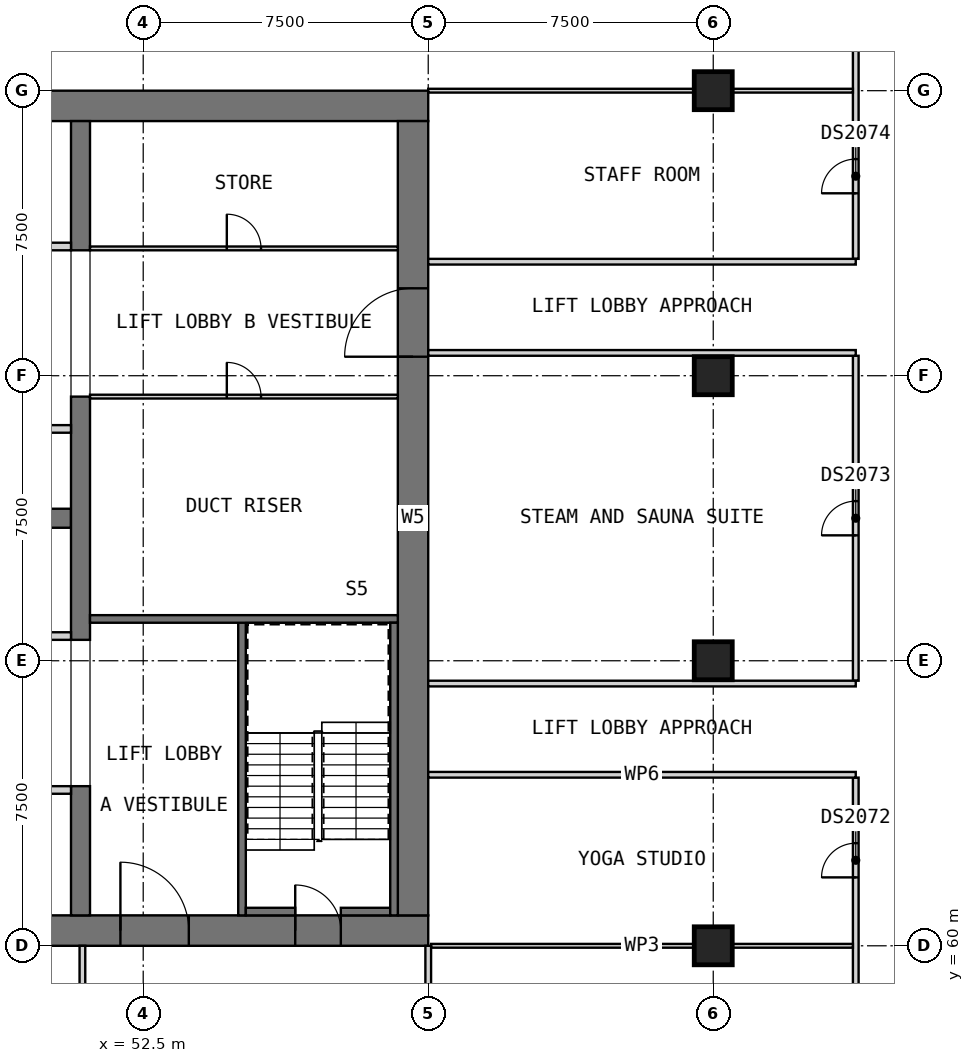
"""IFC4 building model, lengths in metres.
Left out: names, types, materials, properties, quantities, classifications, styles, units other than length and angle.
Written with IfcOpenShell. Run it as: python <this file> out.ifc"""

import sys

from ifc_helpers import new_model, si_unit, direction, frame, frame_2d, origin, origin_2d, place, context, subcontext, project, spatial, rectangle, extrude, element, fill, save


model = new_model("IFC4")
c1 = context("Model", 3, precision=1e-05, world=origin(), true_north=direction((0.0, 1.0)))
c2 = subcontext(c1, "Body", "Model", "MODEL_VIEW")
j1 = project(units=[si_unit("LENGTHUNIT", "METRE"), si_unit("PLANEANGLEUNIT", "RADIAN")], contexts=[c1])
p1 = place(None, origin())
s1 = spatial("IfcSite", under=j1, at=p1, CompositionType="ELEMENT")
p2 = place(p1, origin())
s2 = spatial("IfcBuilding", under=s1, at=p2, CompositionType="ELEMENT")
p3 = place(p2, frame((0.0, 0.0, 162.6)))
s3 = spatial("IfcBuildingStorey", under=s2, at=p3, CompositionType="ELEMENT", Elevation=162.6)
for number, where, z_axis, x_axis in (
    (1, (67.5, 60.0, 0.0), (0.0, 0.0, 1.0), (1.0, 0.0, 0.0)),
    (2, (67.5, 67.5, 0.0), (0.0, 0.0, 1.0), (1.0, 0.0, 0.0)),
    (3, (67.5, 75.0, 0.0), (0.0, 0.0, 1.0), (1.0, 0.0, 0.0)),
    (4, (67.5, 82.5, 0.0), (0.0, 0.0, 1.0), (1.0, 0.0, 0.0)),
):
    element("IfcColumn", number, at=place(p3, frame(where, z_axis=z_axis, x_axis=x_axis)), inside=s3, PredefinedType="COLUMN", context=c2, shape_type="SweptSolid", body=[
        extrude(rectangle(XDim=1.0, YDim=1.0, at=origin_2d()), origin(), (0.0, 0.0, 1.0), 3.6),
    ])
p4 = place(p3, frame((30.0, 60.4, 0.0), z_axis=(0.0, 0.0, 1.0), x_axis=(1.0, 0.0, 0.0)))
e5 = element("IfcWall", 5, at=p4, inside=s3, PredefinedType="SHEAR", context=c2, shape_type="SweptSolid", body=[
    extrude(rectangle(XDim=30.0, YDim=0.8, at=frame_2d((15.0, 0.0))), origin(), (0.0, 0.0, 1.0), 3.6),
])
p5 = place(p4, frame((21.9, 0.0, 0.0)))
e6 = element("IfcOpeningElement", 6, at=p5, cuts=e5, PredefinedType="OPENING", context=c2, shape_type="SweptSolid", body=[
    extrude(rectangle(XDim=1.8, YDim=2.1, at=frame_2d((0.9, 1.05))), frame((0.0, 0.41, 0.0), z_axis=(0.0, -1.0, 0.0), x_axis=(1.0, 0.0, 0.0)), (0.0, 0.0, 1.0), 0.82),
])
p6 = place(p4, frame((26.5, 0.0, 0.0)))
e7 = element("IfcOpeningElement", 7, at=p6, cuts=e5, PredefinedType="OPENING", context=c2, shape_type="SweptSolid", body=[
    extrude(rectangle(XDim=1.2, YDim=2.1, at=frame_2d((0.6, 1.05))), frame((0.0, 0.41, 0.0), z_axis=(0.0, -1.0, 0.0), x_axis=(1.0, 0.0, 0.0)), (0.0, 0.0, 1.0), 0.82),
])
p7 = place(p3, frame((30.0, 82.1, 0.0), z_axis=(0.0, 0.0, 1.0), x_axis=(1.0, 0.0, 0.0)))
e8 = element("IfcWall", 8, at=p7, inside=s3, PredefinedType="SHEAR", context=c2, shape_type="SweptSolid", body=[
    extrude(rectangle(XDim=30.0, YDim=0.8, at=frame_2d((15.0, 0.0))), origin(), (0.0, 0.0, 1.0), 3.6),
])
p8 = place(p3, frame((59.6, 60.8, 0.0), z_axis=(0.0, 0.0, 1.0), x_axis=(0.0, 1.0, 0.0)))
e9 = element("IfcWall", 9, at=p8, inside=s3, PredefinedType="SHEAR", context=c2, shape_type="SweptSolid", body=[
    extrude(rectangle(XDim=20.9, YDim=0.8, at=frame_2d((10.45, 0.0))), origin(), (0.0, 0.0, 1.0), 3.6),
])
p9 = place(p8, frame((14.7, 0.0, 0.0)))
e10 = element("IfcOpeningElement", 10, at=p9, cuts=e9, PredefinedType="OPENING", context=c2, shape_type="SweptSolid", body=[
    extrude(rectangle(XDim=1.8, YDim=2.1, at=frame_2d((0.9, 1.05))), frame((0.0, 0.41, 0.0), z_axis=(0.0, -1.0, 0.0), x_axis=(1.0, 0.0, 0.0)), (0.0, 0.0, 1.0), 0.82),
])
p10 = place(p3, frame((35.0, 71.25, 0.0), z_axis=(0.0, 0.0, 1.0), x_axis=(1.0, 0.0, 0.0)))
e11 = element("IfcWall", 11, at=p10, inside=s3, PredefinedType="SHEAR", context=c2, shape_type="SweptSolid", body=[
    extrude(rectangle(XDim=15.6, YDim=0.5, at=frame_2d((7.8, 0.0))), origin(), (0.0, 0.0, 1.0), 3.6),
])
p11 = place(p3, frame((50.85, 60.8, 0.0), z_axis=(0.0, 0.0, 1.0), x_axis=(0.0, 1.0, 0.0)))
e12 = element("IfcWall", 12, at=p11, inside=s3, PredefinedType="SHEAR", context=c2, shape_type="SweptSolid", body=[
    extrude(rectangle(XDim=3.4, YDim=0.5, at=frame_2d((1.7, 0.0))), origin(), (0.0, 0.0, 1.0), 3.6),
])
p12 = place(p3, frame((50.85, 68.05, 0.0), z_axis=(0.0, 0.0, 1.0), x_axis=(0.0, 1.0, 0.0)))
e13 = element("IfcWall", 13, at=p12, inside=s3, PredefinedType="SHEAR", context=c2, shape_type="SweptSolid", body=[
    extrude(rectangle(XDim=6.4, YDim=0.5, at=frame_2d((3.2, 0.0))), origin(), (0.0, 0.0, 1.0), 3.6),
])
p13 = place(p3, frame((50.85, 78.3, 0.0), z_axis=(0.0, 0.0, 1.0), x_axis=(0.0, 1.0, 0.0)))
e14 = element("IfcWall", 14, at=p13, inside=s3, PredefinedType="SHEAR", context=c2, shape_type="SweptSolid", body=[
    extrude(rectangle(XDim=3.4, YDim=0.5, at=frame_2d((1.7, 0.0))), origin(), (0.0, 0.0, 1.0), 3.6),
])
p14 = place(p3, frame((35.0, 64.1, 0.0), z_axis=(0.0, 0.0, 1.0), x_axis=(1.0, 0.0, 0.0)))
e15 = element("IfcWall", 15, at=p14, inside=s3, PredefinedType="PARTITIONING", context=c2, shape_type="SweptSolid", body=[
    extrude(rectangle(XDim=15.6, YDim=0.2, at=frame_2d((7.8, 0.0))), origin(), (0.0, 0.0, 1.0), 3.19),
])
p15 = place(p14, frame((3.525, 0.0, 0.0)))
e16 = element("IfcOpeningElement", 16, at=p15, cuts=e15, PredefinedType="OPENING", context=c2, shape_type="SweptSolid", body=[
    extrude(rectangle(XDim=0.9, YDim=2.1, at=frame_2d((0.45, 1.05))), frame((0.0, 0.11, 0.0), z_axis=(0.0, -1.0, 0.0), x_axis=(1.0, 0.0, 0.0)), (0.0, 0.0, 1.0), 0.22),
])
p16 = place(p14, frame((11.325, 0.0, 0.0)))
e17 = element("IfcOpeningElement", 17, at=p16, cuts=e15, PredefinedType="OPENING", context=c2, shape_type="SweptSolid", body=[
    extrude(rectangle(XDim=0.9, YDim=2.1, at=frame_2d((0.45, 1.05))), frame((0.0, 0.11, 0.0), z_axis=(0.0, -1.0, 0.0), x_axis=(1.0, 0.0, 0.0)), (0.0, 0.0, 1.0), 0.22),
])
p17 = place(p3, frame((35.0, 68.15, 0.0), z_axis=(0.0, 0.0, 1.0), x_axis=(1.0, 0.0, 0.0)))
e18 = element("IfcWall", 18, at=p17, inside=s3, PredefinedType="PARTITIONING", context=c2, shape_type="SweptSolid", body=[
    extrude(rectangle(XDim=15.6, YDim=0.2, at=frame_2d((7.8, 0.0))), origin(), (0.0, 0.0, 1.0), 3.19),
])
p18 = place(p17, frame((2.6, 0.0, 0.0)))
e19 = element("IfcOpeningElement", 19, at=p18, cuts=e18, PredefinedType="OPENING", context=c2, shape_type="SweptSolid", body=[
    extrude(rectangle(XDim=0.9, YDim=2.1, at=frame_2d((0.45, 1.05))), frame((0.0, 0.11, 0.0), z_axis=(0.0, -1.0, 0.0), x_axis=(1.0, 0.0, 0.0)), (0.0, 0.0, 1.0), 0.22),
])
p19 = place(p17, frame((10.4, 0.0, 0.0)))
e20 = element("IfcOpeningElement", 20, at=p19, cuts=e18, PredefinedType="OPENING", context=c2, shape_type="SweptSolid", body=[
    extrude(rectangle(XDim=0.9, YDim=2.1, at=frame_2d((0.45, 1.05))), frame((0.0, 0.11, 0.0), z_axis=(0.0, -1.0, 0.0), x_axis=(1.0, 0.0, 0.0)), (0.0, 0.0, 1.0), 0.22),
])
p20 = place(p3, frame((35.0, 73.6, 0.0), z_axis=(0.0, 0.0, 1.0), x_axis=(1.0, 0.0, 0.0)))
e21 = element("IfcWall", 21, at=p20, inside=s3, PredefinedType="SOLIDWALL", context=c2, shape_type="SweptSolid", body=[
    extrude(rectangle(XDim=15.6, YDim=0.2, at=frame_2d((7.8, 0.0))), origin(), (0.0, 0.0, 1.0), 3.6),
])
p21 = place(p20, frame((0.75, 0.0, 0.0)))
e22 = element("IfcOpeningElement", 22, at=p21, cuts=e21, PredefinedType="OPENING", context=c2, shape_type="SweptSolid", body=[
    extrude(rectangle(XDim=1.1, YDim=2.1, at=frame_2d((0.55, 1.05))), frame((0.0, 0.11, 0.0), z_axis=(0.0, -1.0, 0.0), x_axis=(1.0, 0.0, 0.0)), (0.0, 0.0, 1.0), 0.22),
])
p22 = place(p20, frame((3.35, 0.0, 0.0)))
e23 = element("IfcOpeningElement", 23, at=p22, cuts=e21, PredefinedType="OPENING", context=c2, shape_type="SweptSolid", body=[
    extrude(rectangle(XDim=1.1, YDim=2.1, at=frame_2d((0.55, 1.05))), frame((0.0, 0.11, 0.0), z_axis=(0.0, -1.0, 0.0), x_axis=(1.0, 0.0, 0.0)), (0.0, 0.0, 1.0), 0.22),
])
p23 = place(p20, frame((5.95, 0.0, 0.0)))
e24 = element("IfcOpeningElement", 24, at=p23, cuts=e21, PredefinedType="OPENING", context=c2, shape_type="SweptSolid", body=[
    extrude(rectangle(XDim=1.1, YDim=2.1, at=frame_2d((0.55, 1.05))), frame((0.0, 0.11, 0.0), z_axis=(0.0, -1.0, 0.0), x_axis=(1.0, 0.0, 0.0)), (0.0, 0.0, 1.0), 0.22),
])
p24 = place(p20, frame((8.55, 0.0, 0.0)))
e25 = element("IfcOpeningElement", 25, at=p24, cuts=e21, PredefinedType="OPENING", context=c2, shape_type="SweptSolid", body=[
    extrude(rectangle(XDim=1.1, YDim=2.1, at=frame_2d((0.55, 1.05))), frame((0.0, 0.11, 0.0), z_axis=(0.0, -1.0, 0.0), x_axis=(1.0, 0.0, 0.0)), (0.0, 0.0, 1.0), 0.22),
])
p25 = place(p20, frame((11.15, 0.0, 0.0)))
e26 = element("IfcOpeningElement", 26, at=p25, cuts=e21, PredefinedType="OPENING", context=c2, shape_type="SweptSolid", body=[
    extrude(rectangle(XDim=1.1, YDim=2.1, at=frame_2d((0.55, 1.05))), frame((0.0, 0.11, 0.0), z_axis=(0.0, -1.0, 0.0), x_axis=(1.0, 0.0, 0.0)), (0.0, 0.0, 1.0), 0.22),
])
p26 = place(p20, frame((13.75, 0.0, 0.0)))
e27 = element("IfcOpeningElement", 27, at=p26, cuts=e21, PredefinedType="OPENING", context=c2, shape_type="SweptSolid", body=[
    extrude(rectangle(XDim=1.1, YDim=2.1, at=frame_2d((0.55, 1.05))), frame((0.0, 0.11, 0.0), z_axis=(0.0, -1.0, 0.0), x_axis=(1.0, 0.0, 0.0)), (0.0, 0.0, 1.0), 0.22),
])
p27 = place(p3, frame((35.0, 78.4, 0.0), z_axis=(0.0, 0.0, 1.0), x_axis=(1.0, 0.0, 0.0)))
e28 = element("IfcWall", 28, at=p27, inside=s3, PredefinedType="SOLIDWALL", context=c2, shape_type="SweptSolid", body=[
    extrude(rectangle(XDim=15.6, YDim=0.2, at=frame_2d((7.8, 0.0))), origin(), (0.0, 0.0, 1.0), 3.6),
])
p28 = place(p27, frame((0.75, 0.0, 0.0)))
e29 = element("IfcOpeningElement", 29, at=p28, cuts=e28, PredefinedType="OPENING", context=c2, shape_type="SweptSolid", body=[
    extrude(rectangle(XDim=1.1, YDim=2.1, at=frame_2d((0.55, 1.05))), frame((0.0, 0.11, 0.0), z_axis=(0.0, -1.0, 0.0), x_axis=(1.0, 0.0, 0.0)), (0.0, 0.0, 1.0), 0.22),
])
p29 = place(p27, frame((3.35, 0.0, 0.0)))
e30 = element("IfcOpeningElement", 30, at=p29, cuts=e28, PredefinedType="OPENING", context=c2, shape_type="SweptSolid", body=[
    extrude(rectangle(XDim=1.1, YDim=2.1, at=frame_2d((0.55, 1.05))), frame((0.0, 0.11, 0.0), z_axis=(0.0, -1.0, 0.0), x_axis=(1.0, 0.0, 0.0)), (0.0, 0.0, 1.0), 0.22),
])
p30 = place(p27, frame((11.15, 0.0, 0.0)))
e31 = element("IfcOpeningElement", 31, at=p30, cuts=e28, PredefinedType="OPENING", context=c2, shape_type="SweptSolid", body=[
    extrude(rectangle(XDim=1.1, YDim=2.1, at=frame_2d((0.55, 1.05))), frame((0.0, 0.11, 0.0), z_axis=(0.0, -1.0, 0.0), x_axis=(1.0, 0.0, 0.0)), (0.0, 0.0, 1.0), 0.22),
])
p31 = place(p27, frame((13.75, 0.0, 0.0)))
e32 = element("IfcOpeningElement", 32, at=p31, cuts=e28, PredefinedType="OPENING", context=c2, shape_type="SweptSolid", body=[
    extrude(rectangle(XDim=1.1, YDim=2.1, at=frame_2d((0.55, 1.05))), frame((0.0, 0.11, 0.0), z_axis=(0.0, -1.0, 0.0), x_axis=(1.0, 0.0, 0.0)), (0.0, 0.0, 1.0), 0.22),
])
p32 = place(p3, frame((55.1, 60.8, 0.0), z_axis=(0.0, 0.0, 1.0), x_axis=(0.0, 1.0, 0.0)))
e33 = element("IfcWall", 33, at=p32, inside=s3, PredefinedType="SOLIDWALL", context=c2, shape_type="SweptSolid", body=[
    extrude(rectangle(XDim=7.8, YDim=0.2, at=frame_2d((3.9, 0.0))), origin(), (0.0, 0.0, 1.0), 3.19),
])
p33 = place(p3, frame((51.1, 68.6, 0.0), z_axis=(0.0, 0.0, 1.0), x_axis=(1.0, 0.0, 0.0)))
e34 = element("IfcWall", 34, at=p33, inside=s3, PredefinedType="SOLIDWALL", context=c2, shape_type="SweptSolid", body=[
    extrude(rectangle(XDim=8.1, YDim=0.2, at=frame_2d((4.05, 0.0))), origin(), (0.0, 0.0, 1.0), 3.19),
])
for number, where, z_axis, x_axis in (
    (35, (55.2, 60.9, 0.0), (0.0, 0.0, 1.0), (1.0, 0.0, 0.0)),
    (36, (57.7, 60.9, 0.0), (0.0, 0.0, 1.0), (1.0, 0.0, 0.0)),
):
    element("IfcWall", number, at=place(p3, frame(where, z_axis=z_axis, x_axis=x_axis)), inside=s3, PredefinedType="SOLIDWALL", context=c2, shape_type="SweptSolid", body=[
        extrude(rectangle(XDim=1.3, YDim=0.2, at=frame_2d((0.65, 0.0))), origin(), (0.0, 0.0, 1.0), 3.19),
    ])
p34 = place(p3, frame((59.1, 60.8, 0.0), z_axis=(0.0, 0.0, 1.0), x_axis=(0.0, 1.0, 0.0)))
e37 = element("IfcWall", 37, at=p34, inside=s3, PredefinedType="SOLIDWALL", context=c2, shape_type="SweptSolid", body=[
    extrude(rectangle(XDim=7.7, YDim=0.2, at=frame_2d((3.85, 0.0))), origin(), (0.0, 0.0, 1.0), 3.19),
])
p35 = place(p3, frame((51.1, 74.45, 0.0), z_axis=(0.0, 0.0, 1.0), x_axis=(1.0, 0.0, 0.0)))
e38 = element("IfcWall", 38, at=p35, inside=s3, PredefinedType="PARTITIONING", context=c2, shape_type="SweptSolid", body=[
    extrude(rectangle(XDim=8.1, YDim=0.1, at=frame_2d((4.05, 0.0))), origin(), (0.0, 0.0, 1.0), 3.19),
])
p36 = place(p35, frame((3.6, 0.0, 0.0)))
e39 = element("IfcOpeningElement", 39, at=p36, cuts=e38, PredefinedType="OPENING", context=c2, shape_type="SweptSolid", body=[
    extrude(rectangle(XDim=0.9, YDim=2.1, at=frame_2d((0.45, 1.05))), frame((0.0, 0.06, 0.0), z_axis=(0.0, -1.0, 0.0), x_axis=(1.0, 0.0, 0.0)), (0.0, 0.0, 1.0), 0.12),
])
p37 = place(p3, frame((51.1, 78.35, 0.0), z_axis=(0.0, 0.0, 1.0), x_axis=(1.0, 0.0, 0.0)))
e40 = element("IfcWall", 40, at=p37, inside=s3, PredefinedType="PARTITIONING", context=c2, shape_type="SweptSolid", body=[
    extrude(rectangle(XDim=8.1, YDim=0.1, at=frame_2d((4.05, 0.0))), origin(), (0.0, 0.0, 1.0), 3.19),
])
p38 = place(p37, frame((3.6, 0.0, 0.0)))
e41 = element("IfcOpeningElement", 41, at=p38, cuts=e40, PredefinedType="OPENING", context=c2, shape_type="SweptSolid", body=[
    extrude(rectangle(XDim=0.9, YDim=2.1, at=frame_2d((0.45, 1.05))), frame((0.0, 0.06, 0.0), z_axis=(0.0, -1.0, 0.0), x_axis=(1.0, 0.0, 0.0)), (0.0, 0.0, 1.0), 0.12),
])
p39 = place(p3, frame((71.25, 52.575, 0.0), z_axis=(0.0, 0.0, 1.0), x_axis=(0.0, 1.0, 0.0)))
e42 = element("IfcWall", 42, at=p39, inside=s3, PredefinedType="PARTITIONING", context=c2, shape_type="SweptSolid", body=[
    extrude(rectangle(XDim=11.85, YDim=0.15, at=frame_2d((5.925, 0.0))), origin(), (0.0, 0.0, 1.0), 3.2),
])
p40 = place(p39, frame((9.225, 0.0, 0.0)))
e43 = element("IfcOpeningElement", 43, at=p40, cuts=e42, PredefinedType="OPENING", context=c2, shape_type="SweptSolid", body=[
    extrude(rectangle(XDim=0.9, YDim=2.1, at=frame_2d((0.45, 1.05))), frame((0.0, 0.085, 0.0), z_axis=(0.0, -1.0, 0.0), x_axis=(1.0, 0.0, 0.0)), (0.0, 0.0, 1.0), 0.17),
])
p41 = place(p3, frame((71.25, 66.975, 0.0), z_axis=(0.0, 0.0, 1.0), x_axis=(0.0, 1.0, 0.0)))
e44 = element("IfcWall", 44, at=p41, inside=s3, PredefinedType="PARTITIONING", context=c2, shape_type="SweptSolid", body=[
    extrude(rectangle(XDim=8.55, YDim=0.15, at=frame_2d((4.275, 0.0))), origin(), (0.0, 0.0, 1.0), 3.2),
])
p42 = place(p41, frame((3.825, 0.0, 0.0)))
e45 = element("IfcOpeningElement", 45, at=p42, cuts=e44, PredefinedType="OPENING", context=c2, shape_type="SweptSolid", body=[
    extrude(rectangle(XDim=0.9, YDim=2.1, at=frame_2d((0.45, 1.05))), frame((0.0, 0.085, 0.0), z_axis=(0.0, -1.0, 0.0), x_axis=(1.0, 0.0, 0.0)), (0.0, 0.0, 1.0), 0.17),
])
p43 = place(p3, frame((71.25, 78.075, 0.0), z_axis=(0.0, 0.0, 1.0), x_axis=(0.0, 1.0, 0.0)))
e46 = element("IfcWall", 46, at=p43, inside=s3, PredefinedType="PARTITIONING", context=c2, shape_type="SweptSolid", body=[
    extrude(rectangle(XDim=8.1, YDim=0.15, at=frame_2d((4.05, 0.0))), origin(), (0.0, 0.0, 1.0), 3.2),
])
p44 = place(p43, frame((5.85, 0.0, 0.0)))
e47 = element("IfcOpeningElement", 47, at=p44, cuts=e46, PredefinedType="OPENING", context=c2, shape_type="SweptSolid", body=[
    extrude(rectangle(XDim=0.9, YDim=2.1, at=frame_2d((0.45, 1.05))), frame((0.0, 0.085, 0.0), z_axis=(0.0, -1.0, 0.0), x_axis=(1.0, 0.0, 0.0)), (0.0, 0.0, 1.0), 0.17),
])
p45 = place(p43, frame((1.725, 0.0, 0.0)))
e48 = element("IfcOpeningElement", 48, at=p45, cuts=e46, PredefinedType="OPENING", context=c2, shape_type="SweptSolid", body=[
    extrude(rectangle(XDim=0.9, YDim=2.1, at=frame_2d((0.45, 1.05))), frame((0.0, 0.085, 0.0), z_axis=(0.0, -1.0, 0.0), x_axis=(1.0, 0.0, 0.0)), (0.0, 0.0, 1.0), 0.17),
])
p46 = place(p3, frame((60.075, 60.0, 0.0), z_axis=(0.0, 0.0, 1.0), x_axis=(1.0, 0.0, 0.0)))
e49 = element("IfcWall", 49, at=p46, inside=s3, PredefinedType="PARTITIONING", context=c2, shape_type="SweptSolid", body=[
    extrude(rectangle(XDim=11.1, YDim=0.1, at=frame_2d((5.55, 0.0))), origin(), (0.0, 0.0, 1.0), 3.2),
])
p47 = place(p3, frame((60.0, 82.5, 0.0), z_axis=(0.0, 0.0, 1.0), x_axis=(1.0, 0.0, 0.0)))
e50 = element("IfcWall", 50, at=p47, inside=s3, PredefinedType="PARTITIONING", context=c2, shape_type="SweptSolid", body=[
    extrude(rectangle(XDim=11.175, YDim=0.1, at=frame_2d((5.587, 0.0))), origin(), (0.0, 0.0, 1.0), 3.2),
])
for number, where, z_axis, x_axis in (
    (51, (60.0, 64.5, 0.0), (0.0, 0.0, 1.0), (1.0, 0.0, 0.0)),
    (52, (60.0, 66.9, 0.0), (0.0, 0.0, 1.0), (1.0, 0.0, 0.0)),
    (53, (60.0, 75.6, 0.0), (0.0, 0.0, 1.0), (1.0, 0.0, 0.0)),
    (54, (60.0, 78.0, 0.0), (0.0, 0.0, 1.0), (1.0, 0.0, 0.0)),
):
    element("IfcWall", number, at=place(p3, frame(where, z_axis=z_axis, x_axis=x_axis)), inside=s3, PredefinedType="PARTITIONING", context=c2, shape_type="SweptSolid", body=[
        extrude(rectangle(XDim=11.25, YDim=0.15, at=frame_2d((5.625, 0.0))), origin(), (0.0, 0.0, 1.0), 3.2),
    ])
for number, where, z_axis, x_axis in (
    (55, (50.9, 52.575, 0.0), (0.0, 0.0, 1.0), (0.0, 1.0, 0.0)),
    (56, (60.0, 52.575, 0.0), (0.0, 0.0, 1.0), (0.0, 1.0, 0.0)),
):
    element("IfcWall", number, at=place(p3, frame(where, z_axis=z_axis, x_axis=x_axis)), inside=s3, PredefinedType="PARTITIONING", context=c2, shape_type="SweptSolid", body=[
        extrude(rectangle(XDim=7.425, YDim=0.15, at=frame_2d((3.712, 0.0))), origin(), (0.0, 0.0, 1.0), 3.2),
    ])
p48 = place(p5, origin())
e57 = element("IfcDoor", 57, at=p48, inside=s3, OperationType="DOUBLE_DOOR_SINGLE_SWING", PredefinedType="DOOR", context=c2, shape_type="SweptSolid", body=[
    extrude(rectangle(XDim=1.8, YDim=2.1, at=frame_2d((0.9, 1.05))), frame((0.0, 0.025, 0.0), z_axis=(0.0, -1.0, 0.0), x_axis=(1.0, 0.0, 0.0)), (0.0, 0.0, 1.0), 0.05),
])
fill(e6, e57)
p49 = place(p9, origin())
e58 = element("IfcDoor", 58, at=p49, inside=s3, OperationType="DOUBLE_DOOR_SINGLE_SWING", PredefinedType="DOOR", context=c2, shape_type="SweptSolid", body=[
    extrude(rectangle(XDim=1.8, YDim=2.1, at=frame_2d((0.9, 1.05))), frame((0.0, 0.025, 0.0), z_axis=(0.0, -1.0, 0.0), x_axis=(1.0, 0.0, 0.0)), (0.0, 0.0, 1.0), 0.05),
])
fill(e10, e58)
p50 = place(p6, origin())
e59 = element("IfcDoor", 59, at=p50, inside=s3, OperationType="SINGLE_SWING_LEFT", PredefinedType="DOOR", context=c2, shape_type="SweptSolid", body=[
    extrude(rectangle(XDim=1.2, YDim=2.1, at=frame_2d((0.6, 1.05))), frame((0.0, 0.025, 0.0), z_axis=(0.0, -1.0, 0.0), x_axis=(1.0, 0.0, 0.0)), (0.0, 0.0, 1.0), 0.05),
])
fill(e7, e59)
p51 = place(p36, origin())
e60 = element("IfcDoor", 60, at=p51, inside=s3, OperationType="SINGLE_SWING_RIGHT", PredefinedType="DOOR", context=c2, shape_type="SweptSolid", body=[
    extrude(rectangle(XDim=0.9, YDim=2.1, at=frame_2d((0.45, 1.05))), frame((0.0, 0.025, 0.0), z_axis=(0.0, -1.0, 0.0), x_axis=(1.0, 0.0, 0.0)), (0.0, 0.0, 1.0), 0.05),
])
fill(e39, e60)
p52 = place(p38, origin())
e61 = element("IfcDoor", 61, at=p52, inside=s3, OperationType="SINGLE_SWING_RIGHT", PredefinedType="DOOR", context=c2, shape_type="SweptSolid", body=[
    extrude(rectangle(XDim=0.9, YDim=2.1, at=frame_2d((0.45, 1.05))), frame((0.0, 0.025, 0.0), z_axis=(0.0, -1.0, 0.0), x_axis=(1.0, 0.0, 0.0)), (0.0, 0.0, 1.0), 0.05),
])
fill(e41, e61)
p53 = place(p40, origin())
e62 = element("IfcDoor", 62, at=p53, inside=s3, OperationType="SINGLE_SWING_LEFT", PredefinedType="DOOR", context=c2, shape_type="SweptSolid", body=[
    extrude(rectangle(XDim=0.9, YDim=2.1, at=frame_2d((0.45, 1.05))), frame((0.0, 0.025, 0.0), z_axis=(0.0, -1.0, 0.0), x_axis=(1.0, 0.0, 0.0)), (0.0, 0.0, 1.0), 0.05),
])
fill(e43, e62)
p54 = place(p42, origin())
e63 = element("IfcDoor", 63, at=p54, inside=s3, OperationType="SINGLE_SWING_LEFT", PredefinedType="DOOR", context=c2, shape_type="SweptSolid", body=[
    extrude(rectangle(XDim=0.9, YDim=2.1, at=frame_2d((0.45, 1.05))), frame((0.0, 0.025, 0.0), z_axis=(0.0, -1.0, 0.0), x_axis=(1.0, 0.0, 0.0)), (0.0, 0.0, 1.0), 0.05),
])
fill(e45, e63)
p55 = place(p45, origin())
e64 = element("IfcDoor", 64, at=p55, inside=s3, OperationType="SINGLE_SWING_LEFT", PredefinedType="DOOR", context=c2, shape_type="SweptSolid", body=[
    extrude(rectangle(XDim=0.9, YDim=2.1, at=frame_2d((0.45, 1.05))), frame((0.0, 0.025, 0.0), z_axis=(0.0, -1.0, 0.0), x_axis=(1.0, 0.0, 0.0)), (0.0, 0.0, 1.0), 0.05),
])
fill(e48, e64)
save(model, sys.argv[1])
